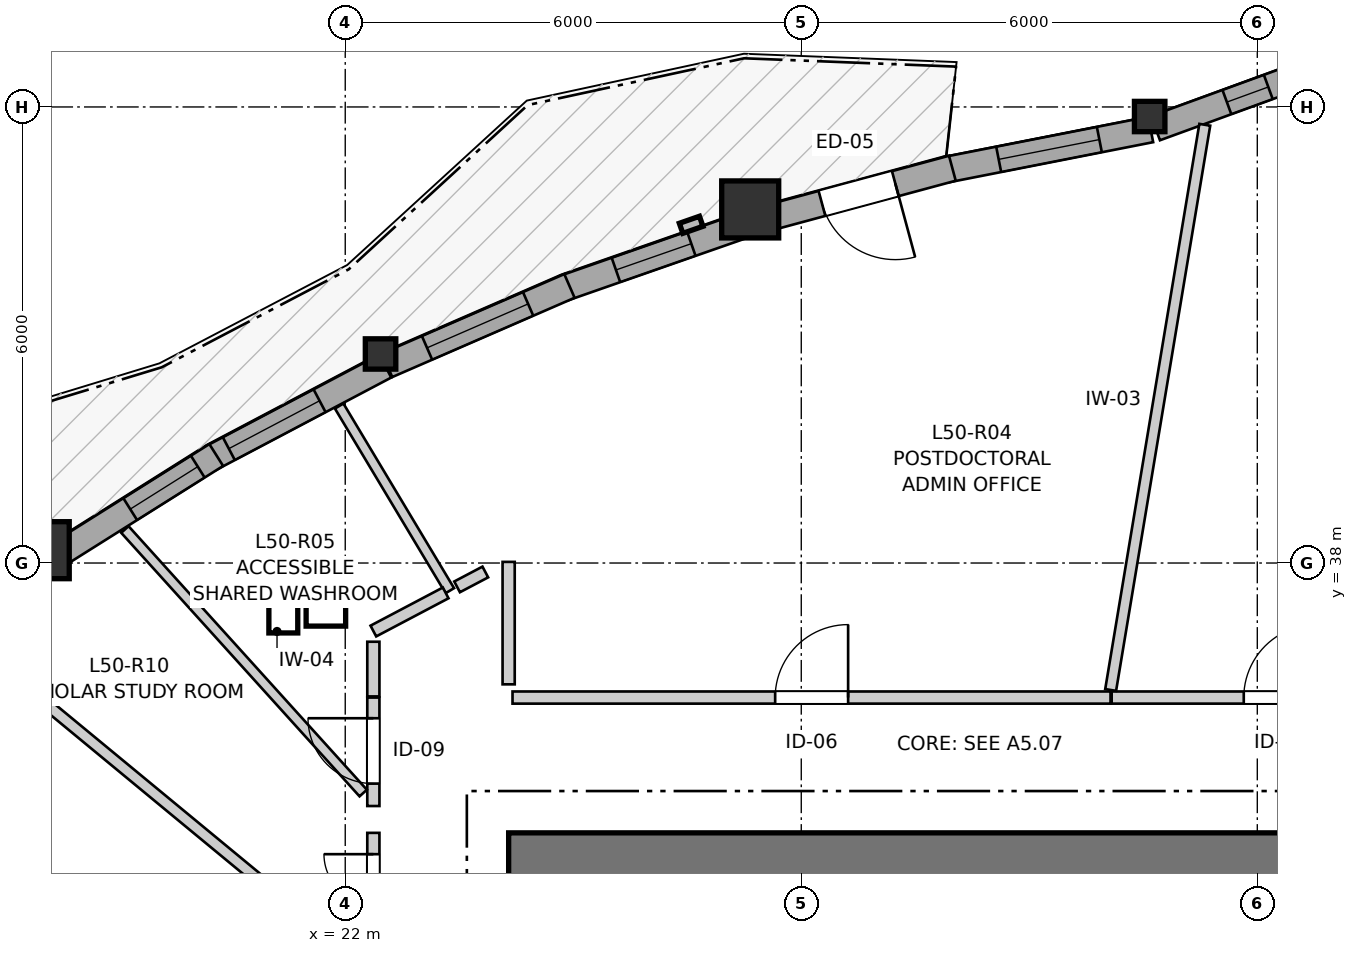
"""IFC4 building model, lengths in metres.
Left out: names, types, materials, properties, quantities, classifications, styles, units other than length and angle.
Written with IfcOpenShell. Run it as: python <this file> out.ifc"""

import sys

from ifc_helpers import new_model, si_unit, direction, frame, frame_2d, origin, origin_2d, place, context, subcontext, project, spatial, rectangle, i_section, extrude, source, transform, mapped, element, fill, save


model = new_model("IFC4")
c1 = context("Model", 3, precision=1e-05, world=origin(), true_north=direction((0.0, 1.0)))
c2 = subcontext(c1, "Body", "Model", "MODEL_VIEW")
j1 = project(units=[si_unit("LENGTHUNIT", "METRE"), si_unit("PLANEANGLEUNIT", "RADIAN")], contexts=[c1])
p1 = place(None, origin())
s1 = spatial("IfcSite", under=j1, at=p1, CompositionType="ELEMENT")
p2 = place(p1, origin())
s2 = spatial("IfcBuilding", under=s1, at=p2, CompositionType="ELEMENT")
p3 = place(p2, frame((0.0, 0.0, 168.2)))
s3 = spatial("IfcBuildingStorey", under=s2, at=p3, CompositionType="ELEMENT", Elevation=168.2)
p4 = place(p3, frame((36.55, 34.125, 0.0), z_axis=(0.0, 0.0, 1.0), x_axis=(-1.0, 0.0, 0.0)))
e1 = element("IfcWall", 1, at=p4, inside=s3, PredefinedType="SHEAR", context=c2, shape_type="SweptSolid", body=[
    extrude(rectangle(XDim=12.4, YDim=0.65, at=frame_2d((6.2, 0.0))), origin(), (0.0, 0.0, 1.0), 2.95),
])
m1 = source(origin(), c2, "Body", "SweptSolid", [
    extrude(i_section(OverallWidth=0.401, OverallDepth=0.399, WebThickness=0.023, FlangeThickness=0.036, FilletRadius=0.015, at=origin_2d()), origin(), (0.0, 0.0, 1.0), 2.95),
])
p5 = place(p3, frame((32.584, 43.874, 0.0), z_axis=(0.0, 0.0, 1.0), x_axis=(1.0, 0.0, 0.0)))
e2 = element("IfcColumn", 2, at=p5, inside=s3, PredefinedType="PILASTER", context=c2, shape_type="MappedRepresentation", body=[
    mapped(m1, transform((0.0, 0.0, 0.0), x_axis=(1.0, 0.0, 0.0), y_axis=(0.0, 1.0, 0.0), z_axis=(0.0, 0.0, 1.0), scale=1.0)),
])
m2 = source(origin(), c2, "Body", "SweptSolid", [
    extrude(rectangle(XDim=0.75, YDim=0.75, at=origin_2d()), origin(), (0.0, 0.0, 1.0), 2.95),
])
p6 = place(p3, frame((27.328, 42.652, 0.0), z_axis=(0.0, 0.0, 1.0), x_axis=(1.0, 0.0, 0.0)))
e3 = element("IfcColumn", 3, at=p6, inside=s3, PredefinedType="COLUMN", context=c2, shape_type="MappedRepresentation", body=[
    mapped(m2, transform((0.0, 0.0, 0.0), x_axis=(1.0, 0.0, 0.0), y_axis=(0.0, 1.0, 0.0), z_axis=(0.0, 0.0, 1.0), scale=1.0)),
])
p7 = place(p3, frame((22.465, 40.75, 0.0), z_axis=(0.0, 0.0, 1.0), x_axis=(1.0, 0.0, 0.0)))
e4 = element("IfcColumn", 4, at=p7, inside=s3, PredefinedType="PILASTER", context=c2, shape_type="MappedRepresentation", body=[
    mapped(m1, transform((0.0, 0.0, 0.0), x_axis=(1.0, 0.0, 0.0), y_axis=(0.0, 1.0, 0.0), z_axis=(0.0, 0.0, 1.0), scale=1.0)),
])
p8 = place(p3, frame((17.994, 38.169, 0.0), z_axis=(0.0, 0.0, 1.0), x_axis=(1.0, 0.0, 0.0)))
e5 = element("IfcColumn", 5, at=p8, inside=s3, PredefinedType="COLUMN", context=c2, shape_type="MappedRepresentation", body=[
    mapped(m2, transform((0.0, 0.0, 0.0), x_axis=(1.0, 0.0, 0.0), y_axis=(0.0, 1.0, 0.0), z_axis=(0.0, 0.0, 1.0), scale=1.0)),
])
p9 = place(p3, frame((34.562, 44.415, 0.0), z_axis=(0.0, 0.0, 1.0), x_axis=(-0.939426417976, -0.342750645819, 0.0)))
e6 = element("IfcWall", 6, at=p9, inside=s3, PredefinedType="SOLIDWALL", context=c2, shape_type="SweptSolid", body=[
    extrude(rectangle(XDim=2.023, YDim=0.34, at=frame_2d((1.011, 0.0))), origin(), (0.0, 0.0, 1.0), 2.53),
])
p10 = place(p9, frame((0.444, 0.0, 0.82)))
e7 = element("IfcOpeningElement", 7, at=p10, cuts=e6, PredefinedType="OPENING", context=c2, shape_type="SweptSolid", body=[
    extrude(rectangle(XDim=0.58, YDim=1.35, at=frame_2d((0.29, 0.675))), frame((0.0, 0.18, 0.0), z_axis=(0.0, -1.0, 0.0), x_axis=(1.0, 0.0, 0.0)), (0.0, 0.0, 1.0), 0.36),
])
p11 = place(p3, frame((32.597, 43.704, 0.0), z_axis=(0.0, 0.0, 1.0), x_axis=(-0.981214876679, -0.192918028667, 0.0)))
e8 = element("IfcWall", 8, at=p11, inside=s3, PredefinedType="SOLIDWALL", context=c2, shape_type="SweptSolid", body=[
    extrude(rectangle(XDim=2.746, YDim=0.34, at=frame_2d((1.373, 0.0))), origin(), (0.0, 0.0, 1.0), 2.53),
])
p12 = place(p11, frame((0.688, 0.0, 0.82)))
e9 = element("IfcOpeningElement", 9, at=p12, cuts=e8, PredefinedType="OPENING", context=c2, shape_type="SweptSolid", body=[
    extrude(rectangle(XDim=1.35, YDim=1.45, at=frame_2d((0.675, 0.725))), frame((0.0, 0.18, 0.0), z_axis=(0.0, -1.0, 0.0), x_axis=(1.0, 0.0, 0.0)), (0.0, 0.0, 1.0), 0.36),
])
p13 = place(p3, frame((29.988, 43.194, 0.0), z_axis=(0.0, 0.0, 1.0), x_axis=(-0.965459623591, -0.26055271101, 0.0)))
e10 = element("IfcWall", 10, at=p13, inside=s3, PredefinedType="SOLIDWALL", context=c2, shape_type="SweptSolid", body=[
    extrude(rectangle(XDim=2.554, YDim=0.34, at=frame_2d((1.277, 0.0))), origin(), (0.0, 0.0, 1.0), 2.53),
])
p14 = place(p13, frame((0.777, 0.0, 0.0)))
e11 = element("IfcOpeningElement", 11, at=p14, cuts=e10, PredefinedType="OPENING", context=c2, shape_type="SweptSolid", body=[
    extrude(rectangle(XDim=1.0, YDim=2.1, at=frame_2d((0.5, 1.05))), frame((0.0, 0.18, 0.0), z_axis=(0.0, -1.0, 0.0), x_axis=(1.0, 0.0, 0.0)), (0.0, 0.0, 1.0), 0.36),
])
p15 = place(p3, frame((27.238, 42.44, 0.0), z_axis=(0.0, 0.0, 1.0), x_axis=(-0.944135459374, -0.329557634341, 0.0)))
e12 = element("IfcWall", 12, at=p15, inside=s3, PredefinedType="SOLIDWALL", context=c2, shape_type="SweptSolid", body=[
    extrude(rectangle(XDim=2.51, YDim=0.34, at=frame_2d((1.255, 0.0))), origin(), (0.0, 0.0, 1.0), 2.53),
])
p16 = place(p15, frame((0.725, 0.0, 0.82)))
e13 = element("IfcOpeningElement", 13, at=p16, cuts=e12, PredefinedType="OPENING", context=c2, shape_type="SweptSolid", body=[
    extrude(rectangle(XDim=1.05, YDim=1.45, at=frame_2d((0.525, 0.725))), frame((0.0, 0.18, 0.0), z_axis=(0.0, -1.0, 0.0), x_axis=(1.0, 0.0, 0.0)), (0.0, 0.0, 1.0), 0.36),
])
p17 = place(p3, frame((24.95, 41.645, 0.0), z_axis=(0.0, 0.0, 1.0), x_axis=(-0.917090826553, -0.398678336322, 0.0)))
e14 = element("IfcWall", 14, at=p17, inside=s3, PredefinedType="SOLIDWALL", context=c2, shape_type="SweptSolid", body=[
    extrude(rectangle(XDim=2.616, YDim=0.34, at=frame_2d((1.308, 0.0))), origin(), (0.0, 0.0, 1.0), 2.53),
])
p18 = place(p17, frame((0.593, 0.0, 0.82)))
e15 = element("IfcOpeningElement", 15, at=p18, cuts=e14, PredefinedType="OPENING", context=c2, shape_type="SweptSolid", body=[
    extrude(rectangle(XDim=1.45, YDim=1.25, at=frame_2d((0.725, 0.625))), frame((0.0, 0.18, 0.0), z_axis=(0.0, -1.0, 0.0), x_axis=(1.0, 0.0, 0.0)), (0.0, 0.0, 1.0), 0.36),
])
p19 = place(p3, frame((22.526, 40.591, 0.0), z_axis=(0.0, 0.0, 1.0), x_axis=(-0.884394438343, -0.46674026763, 0.0)))
e16 = element("IfcWall", 16, at=p19, inside=s3, PredefinedType="SOLIDWALL", context=c2, shape_type="SweptSolid", body=[
    extrude(rectangle(XDim=2.601, YDim=0.34, at=frame_2d((1.301, 0.0))), origin(), (0.0, 0.0, 1.0), 2.53),
])
p20 = place(p19, frame((0.977, 0.0, 0.82)))
e17 = element("IfcOpeningElement", 17, at=p20, cuts=e16, PredefinedType="OPENING", context=c2, shape_type="SweptSolid", body=[
    extrude(rectangle(XDim=1.35, YDim=1.45, at=frame_2d((0.675, 0.725))), frame((0.0, 0.18, 0.0), z_axis=(0.0, -1.0, 0.0), x_axis=(1.0, 0.0, 0.0)), (0.0, 0.0, 1.0), 0.36),
])
p21 = place(p3, frame((20.303, 39.421, 0.0), z_axis=(0.0, 0.0, 1.0), x_axis=(-0.846381586821, -0.532576951707, 0.0)))
e18 = element("IfcWall", 18, at=p21, inside=s3, PredefinedType="SOLIDWALL", context=c2, shape_type="SweptSolid", body=[
    extrude(rectangle(XDim=2.466, YDim=0.34, at=frame_2d((1.233, 0.0))), origin(), (0.0, 0.0, 1.0), 2.53),
])
p22 = place(p21, frame((0.287, 0.0, 0.82)))
e19 = element("IfcOpeningElement", 19, at=p22, cuts=e18, PredefinedType="OPENING", context=c2, shape_type="SweptSolid", body=[
    extrude(rectangle(XDim=1.05, YDim=1.45, at=frame_2d((0.525, 0.725))), frame((0.0, 0.18, 0.0), z_axis=(0.0, -1.0, 0.0), x_axis=(1.0, 0.0, 0.0)), (0.0, 0.0, 1.0), 0.36),
])
p23 = place(p3, frame((24.201, 36.23, 0.0), z_axis=(0.0, 0.0, 1.0), x_axis=(1.0, 0.0, 0.0)))
e20 = element("IfcWall", 20, at=p23, inside=s3, PredefinedType="PARTITIONING", context=c2, shape_type="SweptSolid", body=[
    extrude(rectangle(XDim=7.868, YDim=0.16, at=frame_2d((3.934, 0.0))), origin(), (0.0, 0.0, 1.0), 2.95),
])
p24 = place(p23, frame((3.456, 0.0, 0.0)))
e21 = element("IfcOpeningElement", 21, at=p24, cuts=e20, PredefinedType="OPENING", context=c2, shape_type="SweptSolid", body=[
    extrude(rectangle(XDim=0.96, YDim=2.1, at=frame_2d((0.48, 1.05))), frame((0.0, 0.09, 0.0), z_axis=(0.0, -1.0, 0.0), x_axis=(1.0, 0.0, 0.0)), (0.0, 0.0, 1.0), 0.18),
])
p25 = place(p3, frame((32.084, 36.23, 0.0), z_axis=(0.0, 0.0, 1.0), x_axis=(1.0, 0.0, 0.0)))
e22 = element("IfcWall", 22, at=p25, inside=s3, PredefinedType="PARTITIONING", context=c2, shape_type="SweptSolid", body=[
    extrude(rectangle(XDim=4.466, YDim=0.16, at=frame_2d((2.233, 0.0))), origin(), (0.0, 0.0, 1.0), 2.588),
])
p26 = place(p25, frame((1.738, 0.0, 0.0)))
e23 = element("IfcOpeningElement", 23, at=p26, cuts=e22, PredefinedType="OPENING", context=c2, shape_type="SweptSolid", body=[
    extrude(rectangle(XDim=0.96, YDim=2.1, at=frame_2d((0.48, 1.05))), frame((0.0, 0.09, 0.0), z_axis=(0.0, -1.0, 0.0), x_axis=(1.0, 0.0, 0.0)), (0.0, 0.0, 1.0), 0.18),
])
p27 = place(p3, frame((22.37, 32.624, 0.0), z_axis=(0.0, 0.0, 1.0), x_axis=(0.0, 1.0, 0.0)))
e24 = element("IfcWall", 24, at=p27, inside=s3, PredefinedType="PARTITIONING", context=c2, shape_type="SweptSolid", body=[
    extrude(rectangle(XDim=1.826, YDim=0.16, at=frame_2d((0.913, 0.0))), origin(), (0.0, 0.0, 1.0), 2.95),
])
p28 = place(p27, frame((0.246, 0.0, 0.0)))
e25 = element("IfcOpeningElement", 25, at=p28, cuts=e24, PredefinedType="OPENING", context=c2, shape_type="SweptSolid", body=[
    extrude(rectangle(XDim=1.3, YDim=2.1, at=frame_2d((0.65, 1.05))), frame((0.0, 0.09, 0.0), z_axis=(0.0, -1.0, 0.0), x_axis=(1.0, 0.0, 0.0)), (0.0, 0.0, 1.0), 0.18),
])
p29 = place(p3, frame((22.37, 34.803, 0.0), z_axis=(0.0, 0.0, 1.0), x_axis=(0.0, 1.0, 0.0)))
e26 = element("IfcWall", 26, at=p29, inside=s3, PredefinedType="PARTITIONING", context=c2, shape_type="SweptSolid", body=[
    extrude(rectangle(XDim=1.427, YDim=0.16, at=frame_2d((0.713, 0.0))), origin(), (0.0, 0.0, 1.0), 2.95),
])
p30 = place(p29, frame((0.295, 0.0, 0.0)))
e27 = element("IfcOpeningElement", 27, at=p30, cuts=e26, PredefinedType="OPENING", context=c2, shape_type="SweptSolid", body=[
    extrude(rectangle(XDim=0.86, YDim=2.05, at=frame_2d((0.43, 1.025))), frame((0.0, 0.09, 0.0), z_axis=(0.0, -1.0, 0.0), x_axis=(1.0, 0.0, 0.0)), (0.0, 0.0, 1.0), 0.18),
])
p31 = place(p3, frame((32.071, 36.33, 0.0), z_axis=(0.0, 0.0, 1.0), x_axis=(0.164299199522, 0.986410549942, 0.0)))
e28 = element("IfcWall", 28, at=p31, inside=s3, PredefinedType="PARTITIONING", context=c2, shape_type="SweptSolid", body=[
    extrude(rectangle(XDim=7.538, YDim=0.145, at=frame_2d((3.769, 0.0))), origin(), (0.0, 0.0, 1.0), 2.95),
])
p32 = place(p3, frame((17.028, 37.0, 0.0), z_axis=(0.0, 0.0, 1.0), x_axis=(0.771119105053, -0.636690918596, 0.0)))
e29 = element("IfcWall", 29, at=p32, inside=s3, PredefinedType="PARTITIONING", context=c2, shape_type="SweptSolid", body=[
    extrude(rectangle(XDim=6.756, YDim=0.145, at=frame_2d((3.378, 0.0))), origin(), (0.0, 0.0, 1.0), 2.95),
])
p33 = place(p3, frame((19.101, 38.441, 0.0), z_axis=(0.0, 0.0, 1.0), x_axis=(0.670702711046, -0.741726279295, 0.0)))
e30 = element("IfcWall", 30, at=p33, inside=s3, PredefinedType="PARTITIONING", context=c2, shape_type="SweptSolid", body=[
    extrude(rectangle(XDim=4.675, YDim=0.13, at=frame_2d((2.337, 0.0))), origin(), (0.0, 0.0, 1.0), 2.95),
])
p34 = place(p3, frame((21.92, 40.065, 0.0), z_axis=(0.0, 0.0, 1.0), x_axis=(0.514051974364, -0.857759038223, 0.0)))
e31 = element("IfcWall", 31, at=p34, inside=s3, PredefinedType="PARTITIONING", context=c2, shape_type="SweptSolid", body=[
    extrude(rectangle(XDim=2.832, YDim=0.13, at=frame_2d((1.416, 0.0))), origin(), (0.0, 0.0, 1.0), 2.95),
])
p35 = place(p3, frame((24.15, 36.404, 0.0), z_axis=(0.0, 0.0, 1.0), x_axis=(0.0, 1.0, 0.0)))
e32 = element("IfcWall", 32, at=p35, inside=s3, PredefinedType="PARTITIONING", context=c2, shape_type="SweptSolid", body=[
    extrude(rectangle(XDim=1.611, YDim=0.16, at=frame_2d((0.805, 0.0))), origin(), (0.0, 0.0, 1.0), 2.95),
])
p36 = place(p3, frame((22.37, 37.105, 0.0), z_axis=(0.0, 0.0, 1.0), x_axis=(0.884455008011, 0.466625480234, 0.0)))
e33 = element("IfcWall", 33, at=p36, inside=s3, PredefinedType="PARTITIONING", context=c2, shape_type="SweptSolid", body=[
    extrude(rectangle(XDim=1.076, YDim=0.16, at=frame_2d((0.538, 0.0))), origin(), (0.0, 0.0, 1.0), 2.558),
])
p37 = place(p3, frame((22.37, 36.245, 0.0), z_axis=(0.0, 0.0, 1.0), x_axis=(0.0, 1.0, 0.0)))
e34 = element("IfcWall", 34, at=p37, inside=s3, PredefinedType="PARTITIONING", context=c2, shape_type="SweptSolid", body=[
    extrude(rectangle(XDim=0.719, YDim=0.16, at=frame_2d((0.36, 0.0))), origin(), (0.0, 0.0, 1.0), 2.95),
])
p38 = place(p3, frame((23.472, 37.686, 0.0), z_axis=(0.0, 0.0, 1.0), x_axis=(0.884564737935, 0.466417435782, 0.0)))
e35 = element("IfcWall", 35, at=p38, inside=s3, PredefinedType="PARTITIONING", context=c2, shape_type="SweptSolid", body=[
    extrude(rectangle(XDim=0.42, YDim=0.16, at=frame_2d((0.21, 0.0))), origin(), (0.0, 0.0, 1.0), 2.558),
])
m3 = source(origin(), c2, "Body", "SweptSolid", [
    extrude(rectangle(XDim=0.58, YDim=1.35, at=frame_2d((0.29, 0.675))), frame((0.0, 0.03, 0.0), z_axis=(0.0, -1.0, 0.0), x_axis=(1.0, 0.0, 0.0)), (0.0, 0.0, 1.0), 0.06),
])
p39 = place(p10, origin())
e36 = element("IfcWindow", 36, at=p39, inside=s3, PartitioningType="SINGLE_PANEL", PredefinedType="WINDOW", context=c2, shape_type="MappedRepresentation", body=[
    mapped(m3, transform((0.0, 0.0, 0.0), x_axis=(1.0, 0.0, 0.0), y_axis=(0.0, 1.0, 0.0), z_axis=(0.0, 0.0, 1.0), scale=1.0)),
])
fill(e7, e36)
m4 = source(origin(), c2, "Body", "SweptSolid", [
    extrude(rectangle(XDim=1.35, YDim=1.45, at=frame_2d((0.675, 0.725))), frame((0.0, 0.03, 0.0), z_axis=(0.0, -1.0, 0.0), x_axis=(1.0, 0.0, 0.0)), (0.0, 0.0, 1.0), 0.06),
])
p40 = place(p12, origin())
e37 = element("IfcWindow", 37, at=p40, inside=s3, PartitioningType="SINGLE_PANEL", PredefinedType="WINDOW", context=c2, shape_type="MappedRepresentation", body=[
    mapped(m4, transform((0.0, 0.0, 0.0), x_axis=(1.0, 0.0, 0.0), y_axis=(0.0, 1.0, 0.0), z_axis=(0.0, 0.0, 1.0), scale=1.0)),
])
fill(e9, e37)
m5 = source(origin(), c2, "Body", "SweptSolid", [
    extrude(rectangle(XDim=1.05, YDim=1.45, at=frame_2d((0.525, 0.725))), frame((0.0, 0.03, 0.0), z_axis=(0.0, -1.0, 0.0), x_axis=(1.0, 0.0, 0.0)), (0.0, 0.0, 1.0), 0.06),
])
p41 = place(p16, origin())
e38 = element("IfcWindow", 38, at=p41, inside=s3, PartitioningType="SINGLE_PANEL", PredefinedType="WINDOW", context=c2, shape_type="MappedRepresentation", body=[
    mapped(m5, transform((0.0, 0.0, 0.0), x_axis=(1.0, 0.0, 0.0), y_axis=(0.0, 1.0, 0.0), z_axis=(0.0, 0.0, 1.0), scale=1.0)),
])
fill(e13, e38)
m6 = source(origin(), c2, "Body", "SweptSolid", [
    extrude(rectangle(XDim=1.45, YDim=1.25, at=frame_2d((0.725, 0.625))), frame((0.0, 0.03, 0.0), z_axis=(0.0, -1.0, 0.0), x_axis=(1.0, 0.0, 0.0)), (0.0, 0.0, 1.0), 0.06),
])
p42 = place(p18, origin())
e39 = element("IfcWindow", 39, at=p42, inside=s3, PartitioningType="SINGLE_PANEL", PredefinedType="WINDOW", context=c2, shape_type="MappedRepresentation", body=[
    mapped(m6, transform((0.0, 0.0, 0.0), x_axis=(1.0, 0.0, 0.0), y_axis=(0.0, 1.0, 0.0), z_axis=(0.0, 0.0, 1.0), scale=1.0)),
])
fill(e15, e39)
p43 = place(p20, origin())
e40 = element("IfcWindow", 40, at=p43, inside=s3, PartitioningType="SINGLE_PANEL", PredefinedType="WINDOW", context=c2, shape_type="MappedRepresentation", body=[
    mapped(m4, transform((0.0, 0.0, 0.0), x_axis=(1.0, 0.0, 0.0), y_axis=(0.0, 1.0, 0.0), z_axis=(0.0, 0.0, 1.0), scale=1.0)),
])
fill(e17, e40)
p44 = place(p22, origin())
e41 = element("IfcWindow", 41, at=p44, inside=s3, PartitioningType="SINGLE_PANEL", PredefinedType="WINDOW", context=c2, shape_type="MappedRepresentation", body=[
    mapped(m5, transform((0.0, 0.0, 0.0), x_axis=(1.0, 0.0, 0.0), y_axis=(0.0, 1.0, 0.0), z_axis=(0.0, 0.0, 1.0), scale=1.0)),
])
fill(e19, e41)
m7 = source(origin(), c2, "Body", "SweptSolid", [
    extrude(rectangle(XDim=1.0, YDim=2.1, at=frame_2d((0.5, 1.05))), frame((0.0, 0.025, 0.0), z_axis=(0.0, -1.0, 0.0), x_axis=(1.0, 0.0, 0.0)), (0.0, 0.0, 1.0), 0.05),
])
p45 = place(p14, origin())
e42 = element("IfcDoor", 42, at=p45, inside=s3, OperationType="SINGLE_SWING_LEFT", PredefinedType="DOOR", context=c2, shape_type="MappedRepresentation", body=[
    mapped(m7, transform((0.0, 0.0, 0.0), x_axis=(1.0, 0.0, 0.0), y_axis=(0.0, 1.0, 0.0), z_axis=(0.0, 0.0, 1.0), scale=1.0)),
])
fill(e11, e42)
m8 = source(origin(), c2, "Body", "SweptSolid", [
    extrude(rectangle(XDim=0.96, YDim=2.1, at=frame_2d((0.48, 1.05))), frame((0.0, 0.025, 0.0), z_axis=(0.0, -1.0, 0.0), x_axis=(1.0, 0.0, 0.0)), (0.0, 0.0, 1.0), 0.05),
])
p46 = place(p24, origin())
e43 = element("IfcDoor", 43, at=p46, inside=s3, OperationType="SINGLE_SWING_RIGHT", PredefinedType="DOOR", context=c2, shape_type="MappedRepresentation", body=[
    mapped(m8, transform((0.0, 0.0, 0.0), x_axis=(1.0, 0.0, 0.0), y_axis=(0.0, 1.0, 0.0), z_axis=(0.0, 0.0, 1.0), scale=1.0)),
])
fill(e21, e43)
p47 = place(p26, origin())
e44 = element("IfcDoor", 44, at=p47, inside=s3, OperationType="SINGLE_SWING_RIGHT", PredefinedType="DOOR", context=c2, shape_type="MappedRepresentation", body=[
    mapped(m8, transform((0.0, 0.0, 0.0), x_axis=(1.0, 0.0, 0.0), y_axis=(0.0, 1.0, 0.0), z_axis=(0.0, 0.0, 1.0), scale=1.0)),
])
fill(e23, e44)
m9 = source(origin(), c2, "Body", "SweptSolid", [
    extrude(rectangle(XDim=1.3, YDim=2.1, at=frame_2d((0.65, 1.05))), frame((0.0, 0.025, 0.0), z_axis=(0.0, -1.0, 0.0), x_axis=(1.0, 0.0, 0.0)), (0.0, 0.0, 1.0), 0.05),
])
p48 = place(p28, origin())
e45 = element("IfcDoor", 45, at=p48, inside=s3, OperationType="DOUBLE_DOOR_SINGLE_SWING", PredefinedType="DOOR", context=c2, shape_type="MappedRepresentation", body=[
    mapped(m9, transform((0.0, 0.0, 0.0), x_axis=(1.0, 0.0, 0.0), y_axis=(0.0, 1.0, 0.0), z_axis=(0.0, 0.0, 1.0), scale=1.0)),
])
fill(e25, e45)
m10 = source(origin(), c2, "Body", "SweptSolid", [
    extrude(rectangle(XDim=0.86, YDim=2.05, at=frame_2d((0.43, 1.025))), frame((0.0, 0.025, 0.0), z_axis=(0.0, -1.0, 0.0), x_axis=(1.0, 0.0, 0.0)), (0.0, 0.0, 1.0), 0.05),
])
p49 = place(p30, origin())
e46 = element("IfcDoor", 46, at=p49, inside=s3, OperationType="SINGLE_SWING_RIGHT", PredefinedType="DOOR", context=c2, shape_type="MappedRepresentation", body=[
    mapped(m10, transform((0.0, 0.0, 0.0), x_axis=(1.0, 0.0, 0.0), y_axis=(0.0, 1.0, 0.0), z_axis=(0.0, 0.0, 1.0), scale=1.0)),
])
fill(e27, e46)
save(model, sys.argv[1])
